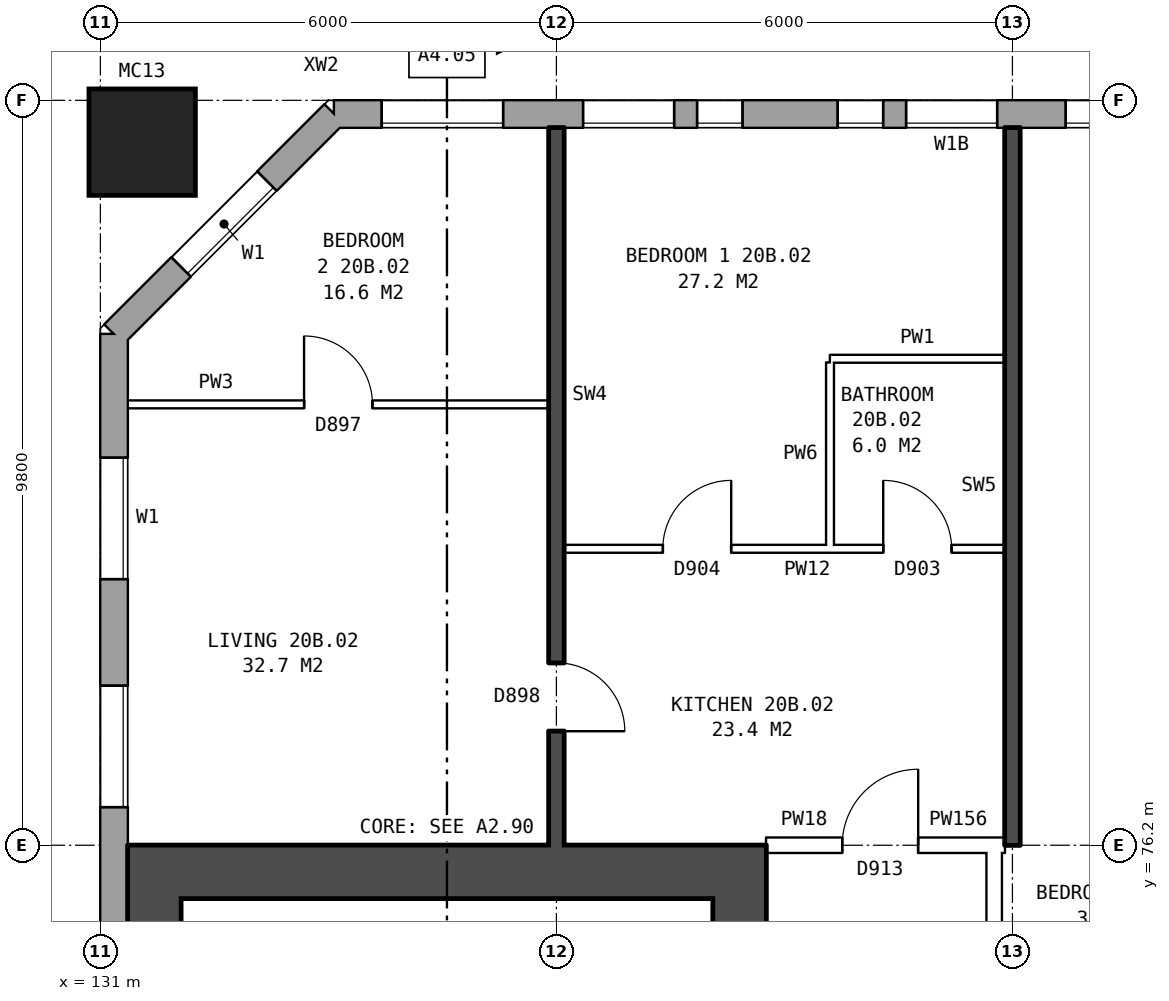
"""IFC4 building model, lengths in metres.
Left out: names, types, materials, properties, quantities, classifications, styles, units other than length and angle.
Written with IfcOpenShell. Run it as: python <this file> out.ifc"""

import sys

from ifc_helpers import new_model, si_unit, direction, frame, frame_2d, origin, origin_2d, place, context, subcontext, project, spatial, rectangle, hollow_rectangle, extrude, element, fill, save


model = new_model("IFC4")
c1 = context("Model", 3, precision=1e-05, world=origin(), true_north=direction((0.0, 1.0)))
c2 = subcontext(c1, "Body", "Model", "MODEL_VIEW")
j1 = project(units=[si_unit("LENGTHUNIT", "METRE"), si_unit("PLANEANGLEUNIT", "RADIAN")], contexts=[c1])
p1 = place(None, origin())
s1 = spatial("IfcSite", under=j1, at=p1, CompositionType="ELEMENT")
p2 = place(p1, origin())
s2 = spatial("IfcBuilding", under=s1, at=p2, CompositionType="ELEMENT")
p3 = place(p2, frame((0.0, 0.0, 74.7)))
s3 = spatial("IfcBuildingStorey", under=s2, at=p3, CompositionType="ELEMENT", Elevation=74.7)
p4 = place(p3, frame((131.55, 85.45, 0.0), z_axis=(0.0, 0.0, 1.0), x_axis=(1.0, 0.0, 0.0)))
e1 = element("IfcColumn", 1, at=p4, inside=s3, PredefinedType="COLUMN", context=c2, shape_type="SweptSolid", body=[
    extrude(hollow_rectangle(XDim=1.4, YDim=1.4, WallThickness=0.075, at=origin_2d()), origin(), (0.0, 0.0, 1.0), 3.1),
])
p5 = place(p3, frame((172.175, 85.82, 0.0), z_axis=(0.0, 0.0, 1.0), x_axis=(-1.0, 0.0, 0.0)))
e2 = element("IfcWall", 2, at=p5, inside=s3, PredefinedType="STANDARD", context=c2, shape_type="SweptSolid", body=[
    extrude(rectangle(XDim=38.101, YDim=0.36, at=frame_2d((19.05, 0.0))), origin(), (0.0, 0.0, 1.0), 2.85),
])
p6 = place(p5, frame((2.875, 0.0, 0.8)))
e3 = element("IfcOpeningElement", 3, at=p6, cuts=e2, PredefinedType="OPENING", context=c2, shape_type="SweptSolid", body=[
    extrude(rectangle(XDim=1.6, YDim=1.8, at=frame_2d((0.8, 0.9))), frame((0.0, 0.19, 0.0), z_axis=(0.0, -1.0, 0.0), x_axis=(1.0, 0.0, 0.0)), (0.0, 0.0, 1.0), 0.38),
])
p7 = place(p5, frame((6.525, 0.0, 0.8)))
e4 = element("IfcOpeningElement", 4, at=p7, cuts=e2, PredefinedType="OPENING", context=c2, shape_type="SweptSolid", body=[
    extrude(rectangle(XDim=0.6, YDim=0.9, at=frame_2d((0.3, 0.45))), frame((0.0, 0.19, 0.0), z_axis=(0.0, -1.0, 0.0), x_axis=(1.0, 0.0, 0.0)), (0.0, 0.0, 1.0), 0.38),
])
p8 = place(p5, frame((8.875, 0.0, 0.8)))
e5 = element("IfcOpeningElement", 5, at=p8, cuts=e2, PredefinedType="OPENING", context=c2, shape_type="SweptSolid", body=[
    extrude(rectangle(XDim=1.6, YDim=1.8, at=frame_2d((0.8, 0.9))), frame((0.0, 0.19, 0.0), z_axis=(0.0, -1.0, 0.0), x_axis=(1.0, 0.0, 0.0)), (0.0, 0.0, 1.0), 0.38),
])
p9 = place(p5, frame((11.875, 0.0, 0.8)))
e6 = element("IfcOpeningElement", 6, at=p9, cuts=e2, PredefinedType="OPENING", context=c2, shape_type="SweptSolid", body=[
    extrude(rectangle(XDim=1.6, YDim=1.8, at=frame_2d((0.8, 0.9))), frame((0.0, 0.19, 0.0), z_axis=(0.0, -1.0, 0.0), x_axis=(1.0, 0.0, 0.0)), (0.0, 0.0, 1.0), 0.38),
])
p10 = place(p5, frame((14.875, 0.0, 0.8)))
e7 = element("IfcOpeningElement", 7, at=p10, cuts=e2, PredefinedType="OPENING", context=c2, shape_type="SweptSolid", body=[
    extrude(rectangle(XDim=1.6, YDim=1.8, at=frame_2d((0.8, 0.9))), frame((0.0, 0.19, 0.0), z_axis=(0.0, -1.0, 0.0), x_axis=(1.0, 0.0, 0.0)), (0.0, 0.0, 1.0), 0.38),
])
p11 = place(p5, frame((17.875, 0.0, 0.8)))
e8 = element("IfcOpeningElement", 8, at=p11, cuts=e2, PredefinedType="OPENING", context=c2, shape_type="SweptSolid", body=[
    extrude(rectangle(XDim=1.6, YDim=1.8, at=frame_2d((0.8, 0.9))), frame((0.0, 0.19, 0.0), z_axis=(0.0, -1.0, 0.0), x_axis=(1.0, 0.0, 0.0)), (0.0, 0.0, 1.0), 0.38),
])
p12 = place(p5, frame((20.875, 0.0, 0.8)))
e9 = element("IfcOpeningElement", 9, at=p12, cuts=e2, PredefinedType="OPENING", context=c2, shape_type="SweptSolid", body=[
    extrude(rectangle(XDim=1.6, YDim=1.8, at=frame_2d((0.8, 0.9))), frame((0.0, 0.19, 0.0), z_axis=(0.0, -1.0, 0.0), x_axis=(1.0, 0.0, 0.0)), (0.0, 0.0, 1.0), 0.38),
])
p13 = place(p5, frame((23.875, 0.0, 0.8)))
e10 = element("IfcOpeningElement", 10, at=p13, cuts=e2, PredefinedType="OPENING", context=c2, shape_type="SweptSolid", body=[
    extrude(rectangle(XDim=1.6, YDim=1.8, at=frame_2d((0.8, 0.9))), frame((0.0, 0.19, 0.0), z_axis=(0.0, -1.0, 0.0), x_axis=(1.0, 0.0, 0.0)), (0.0, 0.0, 1.0), 0.38),
])
p14 = place(p5, frame((26.875, 0.0, 0.8)))
e11 = element("IfcOpeningElement", 11, at=p14, cuts=e2, PredefinedType="OPENING", context=c2, shape_type="SweptSolid", body=[
    extrude(rectangle(XDim=1.6, YDim=1.8, at=frame_2d((0.8, 0.9))), frame((0.0, 0.19, 0.0), z_axis=(0.0, -1.0, 0.0), x_axis=(1.0, 0.0, 0.0)), (0.0, 0.0, 1.0), 0.38),
])
p15 = place(p5, frame((29.375, 0.0, 0.8)))
e12 = element("IfcOpeningElement", 12, at=p15, cuts=e2, PredefinedType="OPENING", context=c2, shape_type="SweptSolid", body=[
    extrude(rectangle(XDim=1.2, YDim=1.8, at=frame_2d((0.6, 0.9))), frame((0.0, 0.19, 0.0), z_axis=(0.0, -1.0, 0.0), x_axis=(1.0, 0.0, 0.0)), (0.0, 0.0, 1.0), 0.38),
])
p16 = place(p5, frame((30.875, 0.0, 0.8)))
e13 = element("IfcOpeningElement", 13, at=p16, cuts=e2, PredefinedType="OPENING", context=c2, shape_type="SweptSolid", body=[
    extrude(rectangle(XDim=0.6, YDim=0.9, at=frame_2d((0.3, 0.45))), frame((0.0, 0.19, 0.0), z_axis=(0.0, -1.0, 0.0), x_axis=(1.0, 0.0, 0.0)), (0.0, 0.0, 1.0), 0.38),
])
p17 = place(p5, frame((35.875, 0.0, 0.8)))
e14 = element("IfcOpeningElement", 14, at=p17, cuts=e2, PredefinedType="OPENING", context=c2, shape_type="SweptSolid", body=[
    extrude(rectangle(XDim=1.6, YDim=1.8, at=frame_2d((0.8, 0.9))), frame((0.0, 0.19, 0.0), z_axis=(0.0, -1.0, 0.0), x_axis=(1.0, 0.0, 0.0)), (0.0, 0.0, 1.0), 0.38),
])
p18 = place(p5, frame((7.425, 0.0, 0.8)))
e15 = element("IfcOpeningElement", 15, at=p18, cuts=e2, PredefinedType="OPENING", context=c2, shape_type="SweptSolid", body=[
    extrude(rectangle(XDim=1.0, YDim=1.8, at=frame_2d((0.5, 0.9))), frame((0.0, 0.19, 0.0), z_axis=(0.0, -1.0, 0.0), x_axis=(1.0, 0.0, 0.0)), (0.0, 0.0, 1.0), 0.38),
])
p19 = place(p5, frame((32.725, 0.0, 1.7)))
e16 = element("IfcOpeningElement", 16, at=p19, cuts=e2, PredefinedType="OPENING", context=c2, shape_type="SweptSolid", body=[
    extrude(rectangle(XDim=0.6, YDim=0.9, at=frame_2d((0.3, 0.45))), frame((0.0, 0.19, 0.0), z_axis=(0.0, -1.0, 0.0), x_axis=(1.0, 0.0, 0.0)), (0.0, 0.0, 1.0), 0.38),
])
p20 = place(p5, frame((33.625, 0.0, 0.8)))
e17 = element("IfcOpeningElement", 17, at=p20, cuts=e2, PredefinedType="OPENING", context=c2, shape_type="SweptSolid", body=[
    extrude(rectangle(XDim=1.2, YDim=1.8, at=frame_2d((0.6, 0.9))), frame((0.0, 0.19, 0.0), z_axis=(0.0, -1.0, 0.0), x_axis=(1.0, 0.0, 0.0)), (0.0, 0.0, 1.0), 0.38),
])
p21 = place(p3, frame((134.075, 85.82, 0.0), z_axis=(0.0, 0.0, 1.0), x_axis=(-0.707106781187, -0.707106781187, 0.0)))
e18 = element("IfcWall", 18, at=p21, inside=s3, PredefinedType="STANDARD", context=c2, shape_type="SweptSolid", body=[
    extrude(rectangle(XDim=4.094, YDim=0.36, at=frame_2d((2.047, 0.0))), origin(), (0.0, 0.0, 1.0), 2.85),
])
p22 = place(p21, frame((1.247, 0.0, 0.8)))
e19 = element("IfcOpeningElement", 19, at=p22, cuts=e18, PredefinedType="OPENING", context=c2, shape_type="SweptSolid", body=[
    extrude(rectangle(XDim=1.6, YDim=1.8, at=frame_2d((0.8, 0.9))), frame((0.0, 0.19, 0.0), z_axis=(0.0, -1.0, 0.0), x_axis=(1.0, 0.0, 0.0)), (0.0, 0.0, 1.0), 0.38),
])
p23 = place(p3, frame((131.18, 82.925, 0.0), z_axis=(0.0, 0.0, 1.0), x_axis=(0.0, -1.0, 0.0)))
e20 = element("IfcWall", 20, at=p23, inside=s3, PredefinedType="STANDARD", context=c2, shape_type="SweptSolid", body=[
    extrude(rectangle(XDim=25.851, YDim=0.36, at=frame_2d((12.925, 0.0))), origin(), (0.0, 0.0, 1.0), 2.85),
])
p24 = place(p23, frame((1.625, 0.0, 0.8)))
e21 = element("IfcOpeningElement", 21, at=p24, cuts=e20, PredefinedType="OPENING", context=c2, shape_type="SweptSolid", body=[
    extrude(rectangle(XDim=1.6, YDim=1.8, at=frame_2d((0.8, 0.9))), frame((0.0, 0.19, 0.0), z_axis=(0.0, -1.0, 0.0), x_axis=(1.0, 0.0, 0.0)), (0.0, 0.0, 1.0), 0.38),
])
p25 = place(p23, frame((4.625, 0.0, 0.8)))
e22 = element("IfcOpeningElement", 22, at=p25, cuts=e20, PredefinedType="OPENING", context=c2, shape_type="SweptSolid", body=[
    extrude(rectangle(XDim=1.6, YDim=1.8, at=frame_2d((0.8, 0.9))), frame((0.0, 0.19, 0.0), z_axis=(0.0, -1.0, 0.0), x_axis=(1.0, 0.0, 0.0)), (0.0, 0.0, 1.0), 0.38),
])
p26 = place(p23, frame((19.625, 0.0, 0.8)))
e23 = element("IfcOpeningElement", 23, at=p26, cuts=e20, PredefinedType="OPENING", context=c2, shape_type="SweptSolid", body=[
    extrude(rectangle(XDim=1.6, YDim=1.8, at=frame_2d((0.8, 0.9))), frame((0.0, 0.19, 0.0), z_axis=(0.0, -1.0, 0.0), x_axis=(1.0, 0.0, 0.0)), (0.0, 0.0, 1.0), 0.38),
])
p27 = place(p23, frame((22.625, 0.0, 0.8)))
e24 = element("IfcOpeningElement", 24, at=p27, cuts=e20, PredefinedType="OPENING", context=c2, shape_type="SweptSolid", body=[
    extrude(rectangle(XDim=1.6, YDim=1.8, at=frame_2d((0.8, 0.9))), frame((0.0, 0.19, 0.0), z_axis=(0.0, -1.0, 0.0), x_axis=(1.0, 0.0, 0.0)), (0.0, 0.0, 1.0), 0.38),
])
p28 = place(p3, frame((139.41, 64.5, 0.0), z_axis=(0.0, 0.0, 1.0), x_axis=(0.0, 1.0, 0.0)))
e25 = element("IfcWall", 25, at=p28, inside=s3, PredefinedType="SHEAR", context=c2, shape_type="SweptSolid", body=[
    extrude(rectangle(XDim=11.0, YDim=0.7, at=frame_2d((5.5, 0.0))), origin(), (0.0, 0.0, 1.0), 2.85),
])
p29 = place(p28, frame((0.625, 0.0, 0.0)))
e26 = element("IfcOpeningElement", 26, at=p29, cuts=e25, PredefinedType="OPENING", context=c2, shape_type="SweptSolid", body=[
    extrude(rectangle(XDim=1.1, YDim=2.1, at=frame_2d((0.55, 1.05))), frame((0.0, 0.36, 0.0), z_axis=(0.0, -1.0, 0.0), x_axis=(1.0, 0.0, 0.0)), (0.0, 0.0, 1.0), 0.72),
])
p30 = place(p28, frame((9.2, 0.0, 0.0)))
e27 = element("IfcOpeningElement", 27, at=p30, cuts=e25, PredefinedType="OPENING", context=c2, shape_type="SweptSolid", body=[
    extrude(rectangle(XDim=1.1, YDim=2.1, at=frame_2d((0.55, 1.05))), frame((0.0, 0.36, 0.0), z_axis=(0.0, -1.0, 0.0), x_axis=(1.0, 0.0, 0.0)), (0.0, 0.0, 1.0), 0.72),
])
p31 = place(p28, frame((7.425, 0.0, 0.0)))
e28 = element("IfcOpeningElement", 28, at=p31, cuts=e25, PredefinedType="OPENING", context=c2, shape_type="SweptSolid", body=[
    extrude(rectangle(XDim=0.85, YDim=2.1, at=frame_2d((0.425, 1.05))), frame((0.0, 0.36, 0.0), z_axis=(0.0, -1.0, 0.0), x_axis=(1.0, 0.0, 0.0)), (0.0, 0.0, 1.0), 0.72),
])
p32 = place(p3, frame((131.71, 64.5, 0.0), z_axis=(0.0, 0.0, 1.0), x_axis=(0.0, 1.0, 0.0)))
e29 = element("IfcWall", 29, at=p32, inside=s3, PredefinedType="SHEAR", context=c2, shape_type="SweptSolid", body=[
    extrude(rectangle(XDim=11.0, YDim=0.7, at=frame_2d((5.5, 0.0))), origin(), (0.0, 0.0, 1.0), 2.85),
])
p33 = place(p3, frame((139.76, 75.85, 0.0), z_axis=(0.0, 0.0, 1.0), x_axis=(-1.0, 0.0, 0.0)))
e30 = element("IfcWall", 30, at=p33, inside=s3, PredefinedType="SHEAR", context=c2, shape_type="SweptSolid", body=[
    extrude(rectangle(XDim=8.4, YDim=0.7, at=frame_2d((4.2, 0.0))), origin(), (0.0, 0.0, 1.0), 2.85),
])
p34 = place(p3, frame((142.76, 63.9, 0.0), z_axis=(0.0, 0.0, 1.0), x_axis=(0.0, 1.0, 0.0)))
e31 = element("IfcWall", 31, at=p34, inside=s3, PredefinedType="PARTITIONING", context=c2, shape_type="SweptSolid", body=[
    extrude(rectangle(XDim=12.2, YDim=0.2, at=frame_2d((6.1, 0.0))), origin(), (0.0, 0.0, 1.0), 2.85),
])
p35 = place(p34, frame((5.1, 0.0, 0.0)))
e32 = element("IfcOpeningElement", 32, at=p35, cuts=e31, PredefinedType="OPENING", context=c2, shape_type="SweptSolid", body=[
    extrude(rectangle(XDim=2.0, YDim=2.1, at=frame_2d((1.0, 1.05))), frame((0.0, 0.11, 0.0), z_axis=(0.0, -1.0, 0.0), x_axis=(1.0, 0.0, 0.0)), (0.0, 0.0, 1.0), 0.22),
])
p36 = place(p3, frame((139.76, 76.2, 0.0), z_axis=(0.0, 0.0, 1.0), x_axis=(1.0, 0.0, 0.0)))
e33 = element("IfcWall", 33, at=p36, inside=s3, PredefinedType="PARTITIONING", context=c2, shape_type="SweptSolid", body=[
    extrude(rectangle(XDim=3.0, YDim=0.2, at=frame_2d((1.5, 0.0))), origin(), (0.0, 0.0, 1.0), 2.85),
])
p37 = place(p36, frame((1.0, 0.0, 0.0)))
e34 = element("IfcOpeningElement", 34, at=p37, cuts=e33, PredefinedType="OPENING", context=c2, shape_type="SweptSolid", body=[
    extrude(rectangle(XDim=1.0, YDim=2.1, at=frame_2d((0.5, 1.05))), frame((0.0, 0.11, 0.0), z_axis=(0.0, -1.0, 0.0), x_axis=(1.0, 0.0, 0.0)), (0.0, 0.0, 1.0), 0.22),
])
p38 = place(p3, frame((142.76, 76.2, 0.0), z_axis=(0.0, 0.0, 1.0), x_axis=(1.0, 0.0, 0.0)))
e35 = element("IfcWall", 35, at=p38, inside=s3, PredefinedType="PARTITIONING", context=c2, shape_type="SweptSolid", body=[
    extrude(rectangle(XDim=0.14, YDim=0.2, at=frame_2d((0.07, 0.0))), origin(), (0.0, 0.0, 1.0), 2.85),
])
p39 = place(p3, frame((137.1, 80.1, 0.0), z_axis=(0.0, 0.0, 1.0), x_axis=(1.0, 0.0, 0.0)))
e36 = element("IfcWall", 36, at=p39, inside=s3, PredefinedType="PARTITIONING", context=c2, shape_type="SweptSolid", body=[
    extrude(rectangle(XDim=5.8, YDim=0.1, at=frame_2d((2.9, 0.0))), origin(), (0.0, 0.0, 1.0), 2.85),
])
p40 = place(p39, frame((1.3, 0.0, 0.0)))
e37 = element("IfcOpeningElement", 37, at=p40, cuts=e36, PredefinedType="OPENING", context=c2, shape_type="SweptSolid", body=[
    extrude(rectangle(XDim=0.9, YDim=2.1, at=frame_2d((0.45, 1.05))), frame((0.0, 0.06, 0.0), z_axis=(0.0, -1.0, 0.0), x_axis=(1.0, 0.0, 0.0)), (0.0, 0.0, 1.0), 0.12),
])
p41 = place(p39, frame((4.2, 0.0, 0.0)))
e38 = element("IfcOpeningElement", 38, at=p41, cuts=e36, PredefinedType="OPENING", context=c2, shape_type="SweptSolid", body=[
    extrude(rectangle(XDim=0.9, YDim=2.1, at=frame_2d((0.45, 1.05))), frame((0.0, 0.06, 0.0), z_axis=(0.0, -1.0, 0.0), x_axis=(1.0, 0.0, 0.0)), (0.0, 0.0, 1.0), 0.12),
])
p42 = place(p3, frame((131.36, 82.0, 0.0), z_axis=(0.0, 0.0, 1.0), x_axis=(1.0, 0.0, 0.0)))
e39 = element("IfcWall", 39, at=p42, inside=s3, PredefinedType="PARTITIONING", context=c2, shape_type="SweptSolid", body=[
    extrude(rectangle(XDim=5.54, YDim=0.1, at=frame_2d((2.77, 0.0))), origin(), (0.0, 0.0, 1.0), 2.85),
])
p43 = place(p42, frame((2.32, 0.0, 0.0)))
e40 = element("IfcOpeningElement", 40, at=p43, cuts=e39, PredefinedType="OPENING", context=c2, shape_type="SweptSolid", body=[
    extrude(rectangle(XDim=0.9, YDim=2.1, at=frame_2d((0.45, 1.05))), frame((0.0, 0.06, 0.0), z_axis=(0.0, -1.0, 0.0), x_axis=(1.0, 0.0, 0.0)), (0.0, 0.0, 1.0), 0.12),
])
p44 = place(p3, frame((140.6, 82.6, 0.0), z_axis=(0.0, 0.0, 1.0), x_axis=(1.0, 0.0, 0.0)))
e41 = element("IfcWall", 41, at=p44, inside=s3, PredefinedType="PARTITIONING", context=c2, shape_type="SweptSolid", body=[
    extrude(rectangle(XDim=2.3, YDim=0.1, at=frame_2d((1.15, 0.0))), origin(), (0.0, 0.0, 1.0), 2.85),
])
p45 = place(p3, frame((137.0, 76.2, 0.0), z_axis=(0.0, 0.0, 1.0), x_axis=(0.0, 1.0, 0.0)))
e42 = element("IfcWall", 42, at=p45, inside=s3, PredefinedType="SOLIDWALL", context=c2, shape_type="SweptSolid", body=[
    extrude(rectangle(XDim=9.44, YDim=0.2, at=frame_2d((4.72, 0.0))), origin(), (0.0, 0.0, 1.0), 2.85),
])
p46 = place(p45, frame((1.5, 0.0, 0.0)))
e43 = element("IfcOpeningElement", 43, at=p46, cuts=e42, PredefinedType="OPENING", context=c2, shape_type="SweptSolid", body=[
    extrude(rectangle(XDim=0.9, YDim=2.1, at=frame_2d((0.45, 1.05))), frame((0.0, 0.11, 0.0), z_axis=(0.0, -1.0, 0.0), x_axis=(1.0, 0.0, 0.0)), (0.0, 0.0, 1.0), 0.22),
])
p47 = place(p3, frame((140.6, 80.15, 0.0), z_axis=(0.0, 0.0, 1.0), x_axis=(0.0, 1.0, 0.0)))
e44 = element("IfcWall", 44, at=p47, inside=s3, PredefinedType="PARTITIONING", context=c2, shape_type="SweptSolid", body=[
    extrude(rectangle(XDim=2.4, YDim=0.1, at=frame_2d((1.2, 0.0))), origin(), (0.0, 0.0, 1.0), 2.85),
])
p48 = place(p3, frame((143.0, 76.2, 0.0), z_axis=(0.0, 0.0, 1.0), x_axis=(0.0, 1.0, 0.0)))
e45 = element("IfcWall", 45, at=p48, inside=s3, PredefinedType="SOLIDWALL", context=c2, shape_type="SweptSolid", body=[
    extrude(rectangle(XDim=9.44, YDim=0.2, at=frame_2d((4.72, 0.0))), origin(), (0.0, 0.0, 1.0), 2.85),
])
p49 = place(p14, origin())
e46 = element("IfcWindow", 46, at=p49, inside=s3, PartitioningType="SINGLE_PANEL", PredefinedType="WINDOW", context=c2, shape_type="SweptSolid", body=[
    extrude(rectangle(XDim=1.6, YDim=1.8, at=frame_2d((0.8, 0.9))), frame((0.0, 0.15, 0.0), z_axis=(0.0, -1.0, 0.0), x_axis=(1.0, 0.0, 0.0)), (0.0, 0.0, 1.0), 0.06),
])
fill(e11, e46)
p50 = place(p15, origin())
e47 = element("IfcWindow", 47, at=p50, inside=s3, PartitioningType="SINGLE_PANEL", PredefinedType="WINDOW", context=c2, shape_type="SweptSolid", body=[
    extrude(rectangle(XDim=1.2, YDim=1.8, at=frame_2d((0.6, 0.9))), frame((0.0, 0.15, 0.0), z_axis=(0.0, -1.0, 0.0), x_axis=(1.0, 0.0, 0.0)), (0.0, 0.0, 1.0), 0.06),
])
fill(e12, e47)
p51 = place(p16, origin())
e48 = element("IfcWindow", 48, at=p51, inside=s3, PartitioningType="SINGLE_PANEL", PredefinedType="WINDOW", context=c2, shape_type="SweptSolid", body=[
    extrude(rectangle(XDim=0.6, YDim=0.9, at=frame_2d((0.3, 0.45))), frame((0.0, 0.15, 0.0), z_axis=(0.0, -1.0, 0.0), x_axis=(1.0, 0.0, 0.0)), (0.0, 0.0, 1.0), 0.06),
])
fill(e13, e48)
p52 = place(p17, origin())
e49 = element("IfcWindow", 49, at=p52, inside=s3, PartitioningType="SINGLE_PANEL", PredefinedType="WINDOW", context=c2, shape_type="SweptSolid", body=[
    extrude(rectangle(XDim=1.6, YDim=1.8, at=frame_2d((0.8, 0.9))), frame((0.0, 0.15, 0.0), z_axis=(0.0, -1.0, 0.0), x_axis=(1.0, 0.0, 0.0)), (0.0, 0.0, 1.0), 0.06),
])
fill(e14, e49)
p53 = place(p22, origin())
e50 = element("IfcWindow", 50, at=p53, inside=s3, PartitioningType="SINGLE_PANEL", PredefinedType="WINDOW", context=c2, shape_type="SweptSolid", body=[
    extrude(rectangle(XDim=1.6, YDim=1.8, at=frame_2d((0.8, 0.9))), frame((0.0, 0.15, 0.0), z_axis=(0.0, -1.0, 0.0), x_axis=(1.0, 0.0, 0.0)), (0.0, 0.0, 1.0), 0.06),
])
fill(e19, e50)
p54 = place(p24, origin())
e51 = element("IfcWindow", 51, at=p54, inside=s3, PartitioningType="SINGLE_PANEL", PredefinedType="WINDOW", context=c2, shape_type="SweptSolid", body=[
    extrude(rectangle(XDim=1.6, YDim=1.8, at=frame_2d((0.8, 0.9))), frame((0.0, 0.15, 0.0), z_axis=(0.0, -1.0, 0.0), x_axis=(1.0, 0.0, 0.0)), (0.0, 0.0, 1.0), 0.06),
])
fill(e21, e51)
p55 = place(p25, origin())
e52 = element("IfcWindow", 52, at=p55, inside=s3, PartitioningType="SINGLE_PANEL", PredefinedType="WINDOW", context=c2, shape_type="SweptSolid", body=[
    extrude(rectangle(XDim=1.6, YDim=1.8, at=frame_2d((0.8, 0.9))), frame((0.0, 0.15, 0.0), z_axis=(0.0, -1.0, 0.0), x_axis=(1.0, 0.0, 0.0)), (0.0, 0.0, 1.0), 0.06),
])
fill(e22, e52)
p56 = place(p40, origin())
e53 = element("IfcDoor", 53, at=p56, inside=s3, OperationType="SINGLE_SWING_RIGHT", PredefinedType="DOOR", context=c2, shape_type="SweptSolid", body=[
    extrude(rectangle(XDim=0.9, YDim=2.1, at=frame_2d((0.45, 1.05))), frame((0.0, 0.025, 0.0), z_axis=(0.0, -1.0, 0.0), x_axis=(1.0, 0.0, 0.0)), (0.0, 0.0, 1.0), 0.05),
])
fill(e37, e53)
p57 = place(p43, origin())
e54 = element("IfcDoor", 54, at=p57, inside=s3, OperationType="SINGLE_SWING_LEFT", PredefinedType="DOOR", context=c2, shape_type="SweptSolid", body=[
    extrude(rectangle(XDim=0.9, YDim=2.1, at=frame_2d((0.45, 1.05))), frame((0.0, 0.025, 0.0), z_axis=(0.0, -1.0, 0.0), x_axis=(1.0, 0.0, 0.0)), (0.0, 0.0, 1.0), 0.05),
])
fill(e40, e54)
p58 = place(p37, origin())
e55 = element("IfcDoor", 55, at=p58, inside=s3, OperationType="SINGLE_SWING_RIGHT", PredefinedType="DOOR", context=c2, shape_type="SweptSolid", body=[
    extrude(rectangle(XDim=1.0, YDim=2.1, at=frame_2d((0.5, 1.05))), frame((0.0, 0.025, 0.0), z_axis=(0.0, -1.0, 0.0), x_axis=(1.0, 0.0, 0.0)), (0.0, 0.0, 1.0), 0.05),
])
fill(e34, e55)
p59 = place(p46, frame((0.9, 0.0, 0.0), z_axis=(0.0, 0.0, 1.0), x_axis=(-1.0, 0.0, 0.0)))
e56 = element("IfcDoor", 56, at=p59, inside=s3, OperationType="SINGLE_SWING_RIGHT", PredefinedType="DOOR", context=c2, shape_type="SweptSolid", body=[
    extrude(rectangle(XDim=0.9, YDim=2.1, at=frame_2d((0.45, 1.05))), frame((0.0, 0.025, 0.0), z_axis=(0.0, -1.0, 0.0), x_axis=(1.0, 0.0, 0.0)), (0.0, 0.0, 1.0), 0.05),
])
fill(e43, e56)
p60 = place(p41, origin())
e57 = element("IfcDoor", 57, at=p60, inside=s3, OperationType="SINGLE_SWING_LEFT", PredefinedType="DOOR", context=c2, shape_type="SweptSolid", body=[
    extrude(rectangle(XDim=0.9, YDim=2.1, at=frame_2d((0.45, 1.05))), frame((0.0, 0.025, 0.0), z_axis=(0.0, -1.0, 0.0), x_axis=(1.0, 0.0, 0.0)), (0.0, 0.0, 1.0), 0.05),
])
fill(e38, e57)
p61 = place(p19, origin())
e58 = element("IfcWindow", 58, at=p61, inside=s3, PartitioningType="SINGLE_PANEL", PredefinedType="WINDOW", context=c2, shape_type="SweptSolid", body=[
    extrude(rectangle(XDim=0.6, YDim=0.9, at=frame_2d((0.3, 0.45))), frame((0.0, 0.15, 0.0), z_axis=(0.0, -1.0, 0.0), x_axis=(1.0, 0.0, 0.0)), (0.0, 0.0, 1.0), 0.06),
])
fill(e16, e58)
p62 = place(p20, origin())
e59 = element("IfcWindow", 59, at=p62, inside=s3, PartitioningType="SINGLE_PANEL", PredefinedType="WINDOW", context=c2, shape_type="SweptSolid", body=[
    extrude(rectangle(XDim=1.2, YDim=1.8, at=frame_2d((0.6, 0.9))), frame((0.0, 0.15, 0.0), z_axis=(0.0, -1.0, 0.0), x_axis=(1.0, 0.0, 0.0)), (0.0, 0.0, 1.0), 0.06),
])
fill(e17, e59)
save(model, sys.argv[1])
